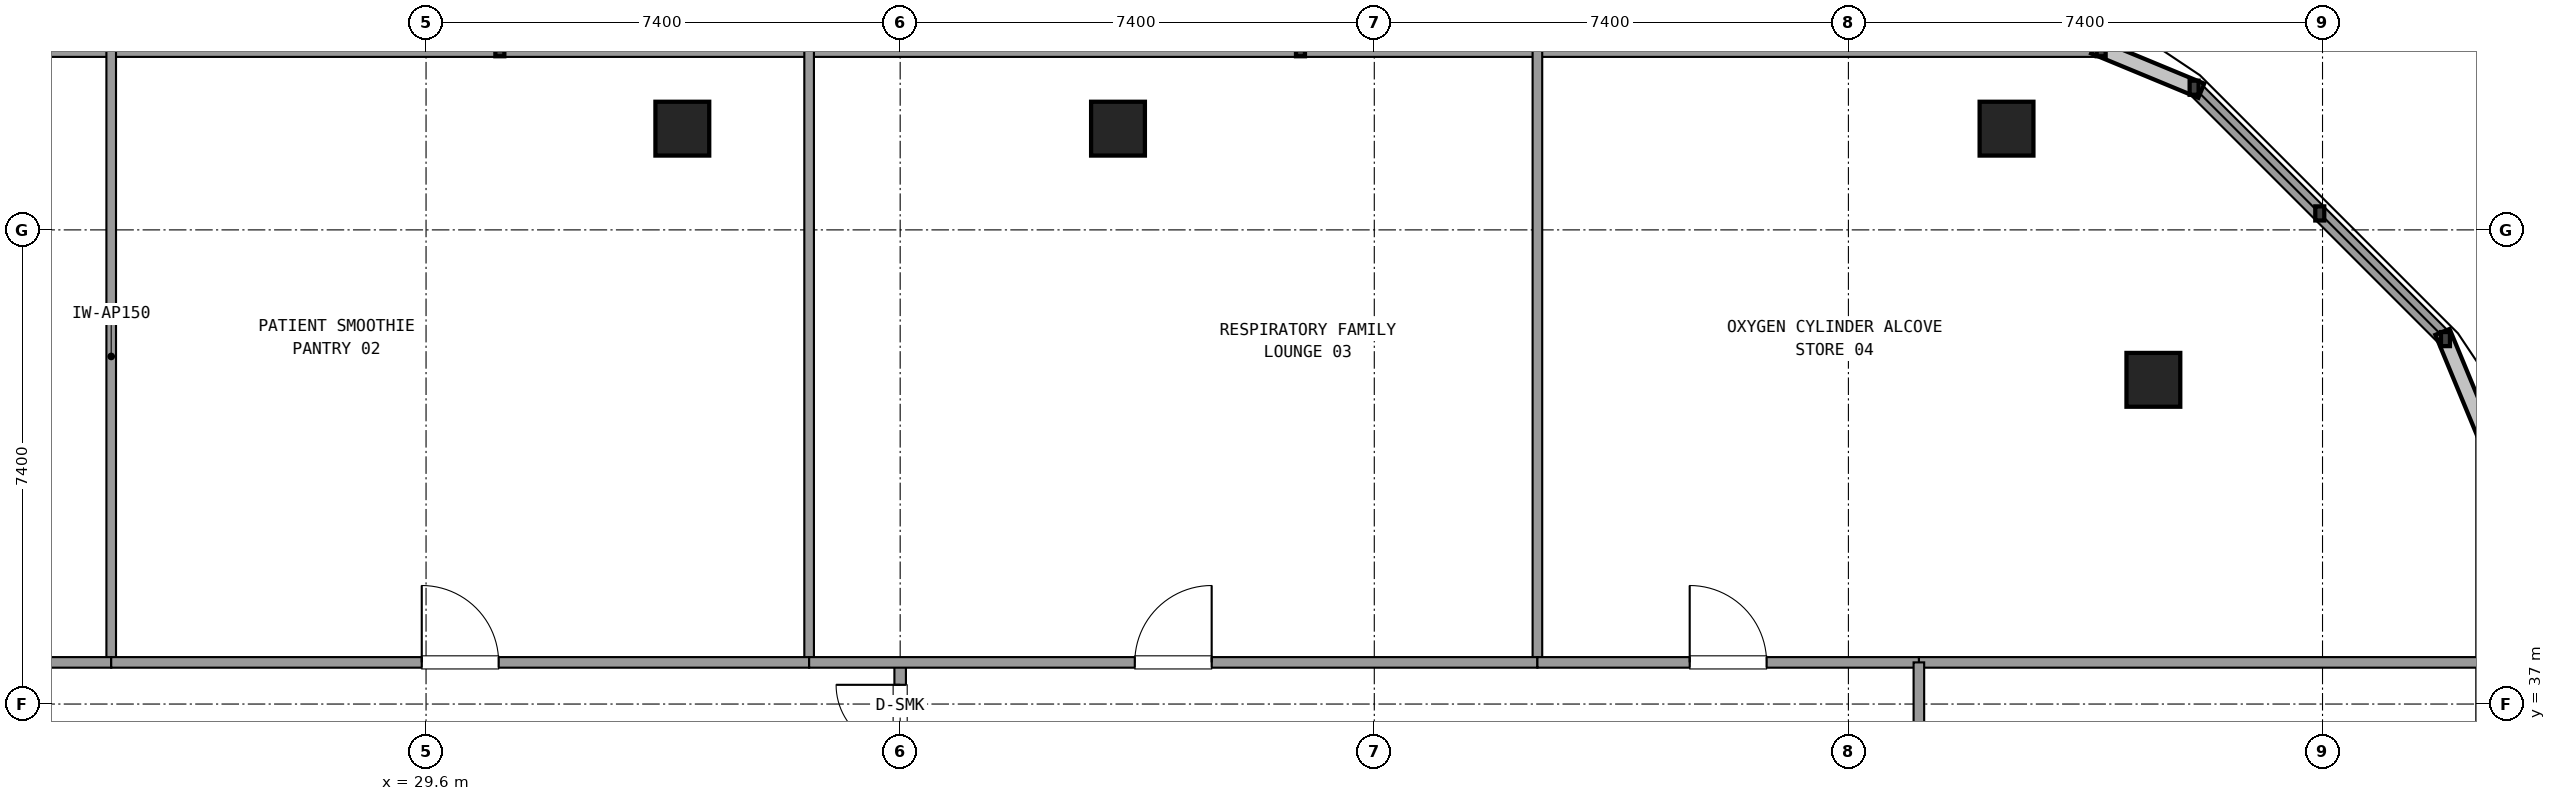
"""IFC4 building model, lengths in metres.
Left out: names, types, materials, properties, quantities, classifications, styles, units other than length and angle.
Written with IfcOpenShell. Run it as: python <this file> out.ifc"""

import sys

from ifc_helpers import new_model, si_unit, direction, frame, frame_2d, origin, origin_2d, place, context, subcontext, project, spatial, rectangle, extrude, element, fill, save


model = new_model("IFC4")
c1 = context("Model", 3, precision=1e-05, world=origin(), true_north=direction((0.0, 1.0)))
c2 = subcontext(c1, "Body", "Model", "MODEL_VIEW")
j1 = project(units=[si_unit("LENGTHUNIT", "METRE"), si_unit("PLANEANGLEUNIT", "RADIAN")], contexts=[c1])
p1 = place(None, origin())
s1 = spatial("IfcSite", under=j1, at=p1, CompositionType="ELEMENT")
p2 = place(p1, origin())
s2 = spatial("IfcBuilding", under=s1, at=p2, CompositionType="ELEMENT")
p3 = place(p2, frame((0.0, 0.0, 271.62)))
s3 = spatial("IfcBuildingStorey", under=s2, at=p3, CompositionType="ELEMENT", Elevation=271.62)
for number, where, z_axis, x_axis in (
    (1, (56.56, 42.06, 0.0), (0.0, 0.0, 1.0), (1.0, 0.0, 0.0)),
    (2, (54.268, 45.98, 0.0), (0.0, 0.0, 1.0), (1.0, 0.0, 0.0)),
    (3, (40.4, 45.98, 0.0), (0.0, 0.0, 1.0), (1.0, 0.0, 0.0)),
    (4, (33.6, 45.98, 0.0), (0.0, 0.0, 1.0), (1.0, 0.0, 0.0)),
):
    element("IfcColumn", number, at=place(p3, frame(where, z_axis=z_axis, x_axis=x_axis)), inside=s3, PredefinedType="COLUMN", context=c2, shape_type="SweptSolid", body=[
        extrude(rectangle(XDim=0.84, YDim=0.84, at=origin_2d()), origin(), (0.0, 0.0, 1.0), 3.6),
    ])
p4 = place(p3, frame((61.72, 27.44, 0.0), z_axis=(0.0, 0.0, 1.0), x_axis=(0.0, 1.0, 0.0)))
e5 = element("IfcWall", 5, at=p4, inside=s3, PredefinedType="SOLIDWALL", context=c2, shape_type="SweptSolid", body=[
    extrude(rectangle(XDim=13.805, YDim=0.24, at=frame_2d((6.903, 0.0))), origin(), (0.0, 0.0, 1.0), 0.85),
])
p5 = place(p3, frame((61.119, 42.696, 0.0), z_axis=(0.0, 0.0, 1.0), x_axis=(-0.707106781187, 0.707106781187, 0.0)))
e6 = element("IfcWall", 6, at=p5, inside=s3, PredefinedType="SOLIDWALL", context=c2, shape_type="SweptSolid", body=[
    extrude(rectangle(XDim=5.548, YDim=0.24, at=frame_2d((2.774, 0.0))), origin(), (0.0, 0.0, 1.0), 0.85),
])
p6 = place(p3, frame((55.745, 47.22, 0.0), z_axis=(0.0, 0.0, 1.0), x_axis=(-1.0, 0.0, 0.0)))
e7 = element("IfcWall", 7, at=p6, inside=s3, PredefinedType="SOLIDWALL", context=c2, shape_type="SweptSolid", body=[
    extrude(rectangle(XDim=37.49, YDim=0.24, at=frame_2d((18.745, 0.0))), origin(), (0.0, 0.0, 1.0), 0.85),
])
p7 = place(p3, frame((37.0, 34.95, 0.0), z_axis=(0.0, 0.0, 1.0), x_axis=(0.0, 1.0, 0.0)))
e8 = element("IfcWall", 8, at=p7, inside=s3, PredefinedType="PARTITIONING", context=c2, shape_type="SweptSolid", body=[
    extrude(rectangle(XDim=2.7, YDim=0.18, at=frame_2d((1.35, 0.0))), origin(), (0.0, 0.0, 1.0), 2.61),
])
p8 = place(p7, frame((0.35, 0.0, 0.0)))
e9 = element("IfcOpeningElement", 9, at=p8, cuts=e8, PredefinedType="OPENING", context=c2, shape_type="SweptSolid", body=[
    extrude(rectangle(XDim=2.0, YDim=2.2, at=frame_2d((1.0, 1.1))), frame((0.0, 0.1, 0.0), z_axis=(0.0, -1.0, 0.0), x_axis=(1.0, 0.0, 0.0)), (0.0, 0.0, 1.0), 0.2),
])
p9 = place(p3, frame((52.9, 37.65, 0.0), z_axis=(0.0, 0.0, 1.0), x_axis=(1.0, 0.0, 0.0)))
e10 = element("IfcWall", 10, at=p9, inside=s3, PredefinedType="PARTITIONING", context=c2, shape_type="SweptSolid", body=[
    extrude(rectangle(XDim=8.8, YDim=0.165, at=frame_2d((4.4, 0.0))), origin(), (0.0, 0.0, 1.0), 2.61),
])
p10 = place(p3, frame((24.686, 37.65, 0.0), z_axis=(0.0, 0.0, 1.0), x_axis=(0.0, 1.0, 0.0)))
e11 = element("IfcWall", 11, at=p10, inside=s3, PredefinedType="PARTITIONING", context=c2, shape_type="SweptSolid", body=[
    extrude(rectangle(XDim=9.55, YDim=0.15, at=frame_2d((4.775, 0.0))), origin(), (0.0, 0.0, 1.0), 2.61),
])
p11 = place(p3, frame((21.1, 37.65, 0.0), z_axis=(0.0, 0.0, 1.0), x_axis=(1.0, 0.0, 0.0)))
e12 = element("IfcWall", 12, at=p11, inside=s3, PredefinedType="PARTITIONING", context=c2, shape_type="SweptSolid", body=[
    extrude(rectangle(XDim=3.586, YDim=0.165, at=frame_2d((1.793, 0.0))), origin(), (0.0, 0.0, 1.0), 2.61),
])
p12 = place(p11, frame((1.193, 0.0, 0.0)))
e13 = element("IfcOpeningElement", 13, at=p12, cuts=e12, PredefinedType="OPENING", context=c2, shape_type="SweptSolid", body=[
    extrude(rectangle(XDim=1.2, YDim=2.15, at=frame_2d((0.6, 1.075))), frame((0.0, 0.093, 0.0), z_axis=(0.0, -1.0, 0.0), x_axis=(1.0, 0.0, 0.0)), (0.0, 0.0, 1.0), 0.185),
])
p13 = place(p3, frame((35.579, 37.65, 0.0), z_axis=(0.0, 0.0, 1.0), x_axis=(0.0, 1.0, 0.0)))
e14 = element("IfcWall", 14, at=p13, inside=s3, PredefinedType="PARTITIONING", context=c2, shape_type="SweptSolid", body=[
    extrude(rectangle(XDim=9.55, YDim=0.15, at=frame_2d((4.775, 0.0))), origin(), (0.0, 0.0, 1.0), 2.61),
])
p14 = place(p3, frame((24.686, 37.65, 0.0), z_axis=(0.0, 0.0, 1.0), x_axis=(1.0, 0.0, 0.0)))
e15 = element("IfcWall", 15, at=p14, inside=s3, PredefinedType="PARTITIONING", context=c2, shape_type="SweptSolid", body=[
    extrude(rectangle(XDim=10.893, YDim=0.165, at=frame_2d((5.447, 0.0))), origin(), (0.0, 0.0, 1.0), 2.61),
])
p15 = place(p14, frame((4.847, 0.0, 0.0)))
e16 = element("IfcOpeningElement", 16, at=p15, cuts=e15, PredefinedType="OPENING", context=c2, shape_type="SweptSolid", body=[
    extrude(rectangle(XDim=1.2, YDim=2.15, at=frame_2d((0.6, 1.075))), frame((0.0, 0.093, 0.0), z_axis=(0.0, -1.0, 0.0), x_axis=(1.0, 0.0, 0.0)), (0.0, 0.0, 1.0), 0.185),
])
p16 = place(p3, frame((46.946, 37.65, 0.0), z_axis=(0.0, 0.0, 1.0), x_axis=(0.0, 1.0, 0.0)))
e17 = element("IfcWall", 17, at=p16, inside=s3, PredefinedType="PARTITIONING", context=c2, shape_type="SweptSolid", body=[
    extrude(rectangle(XDim=9.55, YDim=0.15, at=frame_2d((4.775, 0.0))), origin(), (0.0, 0.0, 1.0), 2.61),
])
p17 = place(p3, frame((35.579, 37.65, 0.0), z_axis=(0.0, 0.0, 1.0), x_axis=(1.0, 0.0, 0.0)))
e18 = element("IfcWall", 18, at=p17, inside=s3, PredefinedType="PARTITIONING", context=c2, shape_type="SweptSolid", body=[
    extrude(rectangle(XDim=11.367, YDim=0.165, at=frame_2d((5.684, 0.0))), origin(), (0.0, 0.0, 1.0), 2.61),
])
p18 = place(p17, frame((5.083, 0.0, 0.0)))
e19 = element("IfcOpeningElement", 19, at=p18, cuts=e18, PredefinedType="OPENING", context=c2, shape_type="SweptSolid", body=[
    extrude(rectangle(XDim=1.2, YDim=2.15, at=frame_2d((0.6, 1.075))), frame((0.0, 0.093, 0.0), z_axis=(0.0, -1.0, 0.0), x_axis=(1.0, 0.0, 0.0)), (0.0, 0.0, 1.0), 0.185),
])
p19 = place(p3, frame((46.946, 37.65, 0.0), z_axis=(0.0, 0.0, 1.0), x_axis=(1.0, 0.0, 0.0)))
e20 = element("IfcWall", 20, at=p19, inside=s3, PredefinedType="PARTITIONING", context=c2, shape_type="SweptSolid", body=[
    extrude(rectangle(XDim=5.954, YDim=0.165, at=frame_2d((2.977, 0.0))), origin(), (0.0, 0.0, 1.0), 2.61),
])
p20 = place(p19, frame((2.377, 0.0, 0.0)))
e21 = element("IfcOpeningElement", 21, at=p20, cuts=e20, PredefinedType="OPENING", context=c2, shape_type="SweptSolid", body=[
    extrude(rectangle(XDim=1.2, YDim=2.15, at=frame_2d((0.6, 1.075))), frame((0.0, 0.093, 0.0), z_axis=(0.0, -1.0, 0.0), x_axis=(1.0, 0.0, 0.0)), (0.0, 0.0, 1.0), 0.185),
])
p21 = place(p3, frame((52.9, 24.1, 0.0), z_axis=(0.0, 0.0, 1.0), x_axis=(0.0, 1.0, 0.0)))
e22 = element("IfcWall", 22, at=p21, inside=s3, PredefinedType="PARTITIONING", context=c2, shape_type="SweptSolid", body=[
    extrude(rectangle(XDim=13.55, YDim=0.165, at=frame_2d((6.775, 0.0))), origin(), (0.0, 0.0, 1.0), 2.61),
])
p22 = place(p21, frame((6.175, 0.0, 0.0)))
e23 = element("IfcOpeningElement", 23, at=p22, cuts=e22, PredefinedType="OPENING", context=c2, shape_type="SweptSolid", body=[
    extrude(rectangle(XDim=1.2, YDim=2.15, at=frame_2d((0.6, 1.075))), frame((0.0, 0.093, 0.0), z_axis=(0.0, -1.0, 0.0), x_axis=(1.0, 0.0, 0.0)), (0.0, 0.0, 1.0), 0.185),
])
p23 = place(p8, origin())
e24 = element("IfcDoor", 24, at=p23, inside=s3, OperationType="DOUBLE_DOOR_SINGLE_SWING", PredefinedType="DOOR", context=c2, shape_type="SweptSolid", body=[
    extrude(rectangle(XDim=2.0, YDim=2.2, at=frame_2d((1.0, 1.1))), frame((0.0, 0.025, 0.0), z_axis=(0.0, -1.0, 0.0), x_axis=(1.0, 0.0, 0.0)), (0.0, 0.0, 1.0), 0.05),
])
fill(e9, e24)
p24 = place(p15, origin())
e25 = element("IfcDoor", 25, at=p24, inside=s3, OperationType="SINGLE_SWING_LEFT", PredefinedType="DOOR", context=c2, shape_type="SweptSolid", body=[
    extrude(rectangle(XDim=1.2, YDim=2.15, at=frame_2d((0.6, 1.075))), frame((0.0, 0.025, 0.0), z_axis=(0.0, -1.0, 0.0), x_axis=(1.0, 0.0, 0.0)), (0.0, 0.0, 1.0), 0.05),
])
fill(e16, e25)
p25 = place(p18, origin())
e26 = element("IfcDoor", 26, at=p25, inside=s3, OperationType="SINGLE_SWING_RIGHT", PredefinedType="DOOR", context=c2, shape_type="SweptSolid", body=[
    extrude(rectangle(XDim=1.2, YDim=2.15, at=frame_2d((0.6, 1.075))), frame((0.0, 0.025, 0.0), z_axis=(0.0, -1.0, 0.0), x_axis=(1.0, 0.0, 0.0)), (0.0, 0.0, 1.0), 0.05),
])
fill(e19, e26)
p26 = place(p20, origin())
e27 = element("IfcDoor", 27, at=p26, inside=s3, OperationType="SINGLE_SWING_LEFT", PredefinedType="DOOR", context=c2, shape_type="SweptSolid", body=[
    extrude(rectangle(XDim=1.2, YDim=2.15, at=frame_2d((0.6, 1.075))), frame((0.0, 0.025, 0.0), z_axis=(0.0, -1.0, 0.0), x_axis=(1.0, 0.0, 0.0)), (0.0, 0.0, 1.0), 0.05),
])
fill(e21, e27)
save(model, sys.argv[1])
